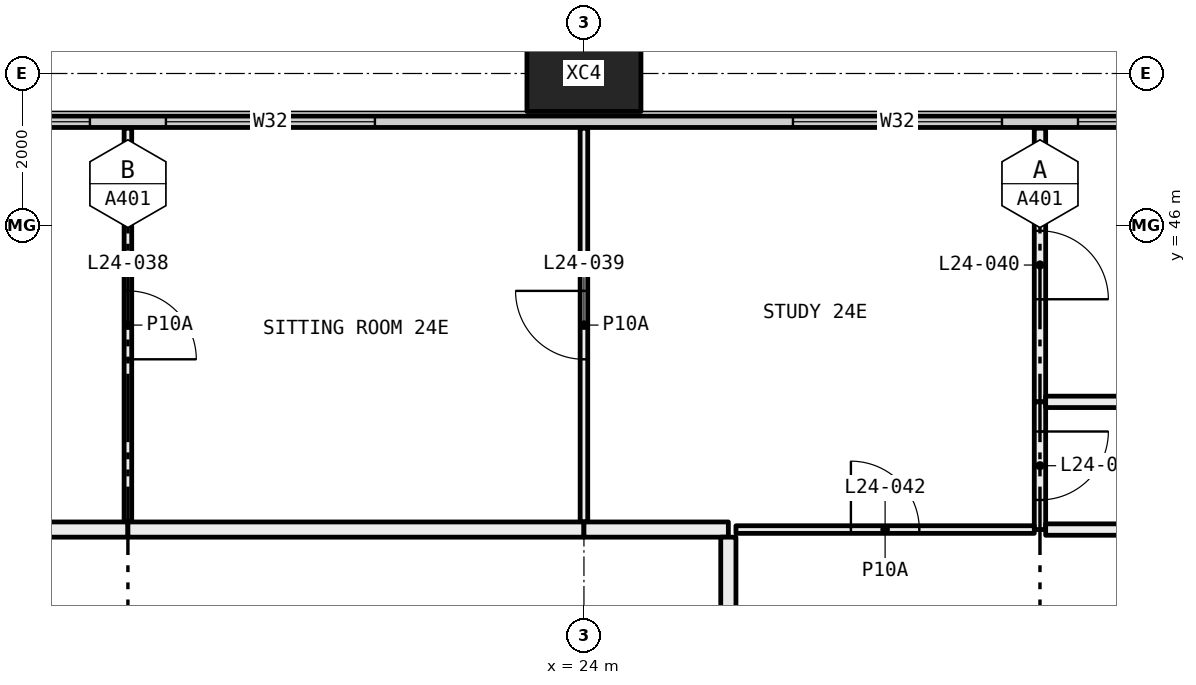
"""IFC4 building model, lengths in metres.
Left out: names, types, materials, properties, quantities, classifications, styles, units other than length and angle.
Written with IfcOpenShell. Run it as: python <this file> out.ifc"""

import sys

from ifc_helpers import new_model, si_unit, direction, frame, frame_2d, origin, origin_2d, place, context, subcontext, project, spatial, rectangle, hollow_rectangle, extrude, element, fill, save


model = new_model("IFC4")
c1 = context("Model", 3, precision=1e-05, world=origin(), true_north=direction((0.0, 1.0)))
c2 = subcontext(c1, "Body", "Model", "MODEL_VIEW")
j1 = project(units=[si_unit("LENGTHUNIT", "METRE"), si_unit("PLANEANGLEUNIT", "RADIAN")], contexts=[c1])
p1 = place(None, origin())
s1 = spatial("IfcSite", under=j1, at=p1, CompositionType="ELEMENT")
p2 = place(p1, origin())
s2 = spatial("IfcBuilding", under=s1, at=p2, CompositionType="ELEMENT")
p3 = place(p2, frame((0.0, 0.0, 96.6)))
s3 = spatial("IfcBuildingStorey", under=s2, at=p3, CompositionType="ELEMENT", Elevation=96.6)
p4 = place(p3, frame((24.0, 48.0, -0.4), z_axis=(0.0, 0.0, 1.0), x_axis=(1.0, 0.0, 0.0)))
e1 = element("IfcColumn", 1, at=p4, inside=s3, PredefinedType="COLUMN", context=c2, shape_type="SweptSolid", body=[
    extrude(hollow_rectangle(XDim=1.5, YDim=1.0, WallThickness=0.06, at=origin_2d()), origin(), (0.0, 0.0, 1.0), 3.45),
])
p5 = place(p3, frame((6.56, 47.365, 0.0), z_axis=(0.0, 0.0, 1.0), x_axis=(1.0, 0.0, 0.0)))
e2 = element("IfcWall", 2, at=p5, inside=s3, PredefinedType="ELEMENTEDWALL", context=c2, shape_type="SweptSolid", body=[
    extrude(rectangle(XDim=58.88, YDim=0.15, at=frame_2d((29.44, 0.0))), origin(), (0.0, 0.0, 1.0), 3.05),
])
p6 = place(p5, frame((0.44, 0.0, 0.45)))
e3 = element("IfcOpeningElement", 3, at=p6, cuts=e2, PredefinedType="OPENING", context=c2, shape_type="SweptSolid", body=[
    extrude(rectangle(XDim=4.5, YDim=2.55, at=frame_2d((2.25, 1.275))), frame((0.0, 0.085, 0.0), z_axis=(0.0, -1.0, 0.0), x_axis=(1.0, 0.0, 0.0)), (0.0, 0.0, 1.0), 0.17),
])
p7 = place(p5, frame((8.19, 0.0, 0.45)))
e4 = element("IfcOpeningElement", 4, at=p7, cuts=e2, PredefinedType="OPENING", context=c2, shape_type="SweptSolid", body=[
    extrude(rectangle(XDim=2.75, YDim=2.55, at=frame_2d((1.375, 1.275))), frame((0.0, 0.085, 0.0), z_axis=(0.0, -1.0, 0.0), x_axis=(1.0, 0.0, 0.0)), (0.0, 0.0, 1.0), 0.17),
])
p8 = place(p5, frame((11.94, 0.0, 0.45)))
e5 = element("IfcOpeningElement", 5, at=p8, cuts=e2, PredefinedType="OPENING", context=c2, shape_type="SweptSolid", body=[
    extrude(rectangle(XDim=2.75, YDim=2.55, at=frame_2d((1.375, 1.275))), frame((0.0, 0.085, 0.0), z_axis=(0.0, -1.0, 0.0), x_axis=(1.0, 0.0, 0.0)), (0.0, 0.0, 1.0), 0.17),
])
p9 = place(p5, frame((20.19, 0.0, 0.45)))
e6 = element("IfcOpeningElement", 6, at=p9, cuts=e2, PredefinedType="OPENING", context=c2, shape_type="SweptSolid", body=[
    extrude(rectangle(XDim=2.75, YDim=2.55, at=frame_2d((1.375, 1.275))), frame((0.0, 0.085, 0.0), z_axis=(0.0, -1.0, 0.0), x_axis=(1.0, 0.0, 0.0)), (0.0, 0.0, 1.0), 0.17),
])
p10 = place(p5, frame((23.94, 0.0, 0.45)))
e7 = element("IfcOpeningElement", 7, at=p10, cuts=e2, PredefinedType="OPENING", context=c2, shape_type="SweptSolid", body=[
    extrude(rectangle(XDim=2.0, YDim=2.55, at=frame_2d((1.0, 1.275))), frame((0.0, 0.085, 0.0), z_axis=(0.0, -1.0, 0.0), x_axis=(1.0, 0.0, 0.0)), (0.0, 0.0, 1.0), 0.17),
])
p11 = place(p5, frame((32.19, 0.0, 0.45)))
e8 = element("IfcOpeningElement", 8, at=p11, cuts=e2, PredefinedType="OPENING", context=c2, shape_type="SweptSolid", body=[
    extrude(rectangle(XDim=2.75, YDim=2.55, at=frame_2d((1.375, 1.275))), frame((0.0, 0.085, 0.0), z_axis=(0.0, -1.0, 0.0), x_axis=(1.0, 0.0, 0.0)), (0.0, 0.0, 1.0), 0.17),
])
p12 = place(p5, frame((35.94, 0.0, 0.45)))
e9 = element("IfcOpeningElement", 9, at=p12, cuts=e2, PredefinedType="OPENING", context=c2, shape_type="SweptSolid", body=[
    extrude(rectangle(XDim=2.75, YDim=2.55, at=frame_2d((1.375, 1.275))), frame((0.0, 0.085, 0.0), z_axis=(0.0, -1.0, 0.0), x_axis=(1.0, 0.0, 0.0)), (0.0, 0.0, 1.0), 0.17),
])
p13 = place(p5, frame((44.19, 0.0, 0.45)))
e10 = element("IfcOpeningElement", 10, at=p13, cuts=e2, PredefinedType="OPENING", context=c2, shape_type="SweptSolid", body=[
    extrude(rectangle(XDim=2.75, YDim=2.55, at=frame_2d((1.375, 1.275))), frame((0.0, 0.085, 0.0), z_axis=(0.0, -1.0, 0.0), x_axis=(1.0, 0.0, 0.0)), (0.0, 0.0, 1.0), 0.17),
])
p14 = place(p5, frame((47.94, 0.0, 0.45)))
e11 = element("IfcOpeningElement", 11, at=p14, cuts=e2, PredefinedType="OPENING", context=c2, shape_type="SweptSolid", body=[
    extrude(rectangle(XDim=2.0, YDim=2.55, at=frame_2d((1.0, 1.275))), frame((0.0, 0.085, 0.0), z_axis=(0.0, -1.0, 0.0), x_axis=(1.0, 0.0, 0.0)), (0.0, 0.0, 1.0), 0.17),
])
p15 = place(p5, frame((53.94, 0.0, 0.45)))
e12 = element("IfcOpeningElement", 12, at=p15, cuts=e2, PredefinedType="OPENING", context=c2, shape_type="SweptSolid", body=[
    extrude(rectangle(XDim=4.5, YDim=2.55, at=frame_2d((2.25, 1.275))), frame((0.0, 0.085, 0.0), z_axis=(0.0, -1.0, 0.0), x_axis=(1.0, 0.0, 0.0)), (0.0, 0.0, 1.0), 0.17),
])
p16 = place(p3, frame((18.0, 42.1, 0.0), z_axis=(0.0, 0.0, 1.0), x_axis=(0.0, 1.0, 0.0)))
e13 = element("IfcWall", 13, at=p16, inside=s3, PredefinedType="PARTITIONING", context=c2, shape_type="SweptSolid", body=[
    extrude(rectangle(XDim=5.18, YDim=0.1, at=frame_2d((2.59, 0.0))), origin(), (0.0, 0.0, 1.0), 3.05),
])
p17 = place(p16, frame((2.14, 0.0, 0.0)))
e14 = element("IfcOpeningElement", 14, at=p17, cuts=e13, PredefinedType="OPENING", context=c2, shape_type="SweptSolid", body=[
    extrude(rectangle(XDim=0.9, YDim=2.1, at=frame_2d((0.45, 1.05))), frame((0.0, 0.06, 0.0), z_axis=(0.0, -1.0, 0.0), x_axis=(1.0, 0.0, 0.0)), (0.0, 0.0, 1.0), 0.12),
])
p18 = place(p3, frame((12.0, 42.0, 0.0), z_axis=(0.0, 0.0, 1.0), x_axis=(1.0, 0.0, 0.0)))
e15 = element("IfcWall", 15, at=p18, inside=s3, PredefinedType="PARTITIONING", context=c2, shape_type="SweptSolid", body=[
    extrude(rectangle(XDim=6.0, YDim=0.2, at=frame_2d((3.0, 0.0))), origin(), (0.0, 0.0, 1.0), 3.05),
])
p19 = place(p18, frame((2.5, 0.0, 0.0)))
e16 = element("IfcOpeningElement", 16, at=p19, cuts=e15, PredefinedType="OPENING", context=c2, shape_type="SweptSolid", body=[
    extrude(rectangle(XDim=1.0, YDim=2.1, at=frame_2d((0.5, 1.05))), frame((0.0, 0.11, 0.0), z_axis=(0.0, -1.0, 0.0), x_axis=(1.0, 0.0, 0.0)), (0.0, 0.0, 1.0), 0.22),
])
p20 = place(p3, frame((24.0, 42.1, 0.0), z_axis=(0.0, 0.0, 1.0), x_axis=(0.0, 1.0, 0.0)))
e17 = element("IfcWall", 17, at=p20, inside=s3, PredefinedType="PARTITIONING", context=c2, shape_type="SweptSolid", body=[
    extrude(rectangle(XDim=5.18, YDim=0.1, at=frame_2d((2.59, 0.0))), origin(), (0.0, 0.0, 1.0), 3.05),
])
p21 = place(p20, frame((2.14, 0.0, 0.0)))
e18 = element("IfcOpeningElement", 18, at=p21, cuts=e17, PredefinedType="OPENING", context=c2, shape_type="SweptSolid", body=[
    extrude(rectangle(XDim=0.9, YDim=2.1, at=frame_2d((0.45, 1.05))), frame((0.0, 0.06, 0.0), z_axis=(0.0, -1.0, 0.0), x_axis=(1.0, 0.0, 0.0)), (0.0, 0.0, 1.0), 0.12),
])
p22 = place(p3, frame((18.0, 42.0, 0.0), z_axis=(0.0, 0.0, 1.0), x_axis=(1.0, 0.0, 0.0)))
e19 = element("IfcWall", 19, at=p22, inside=s3, PredefinedType="PARTITIONING", context=c2, shape_type="SweptSolid", body=[
    extrude(rectangle(XDim=6.0, YDim=0.2, at=frame_2d((3.0, 0.0))), origin(), (0.0, 0.0, 1.0), 3.05),
])
p23 = place(p3, frame((30.0, 43.68, 0.0), z_axis=(0.0, 0.0, 1.0), x_axis=(0.0, 1.0, 0.0)))
e20 = element("IfcWall", 20, at=p23, inside=s3, PredefinedType="PARTITIONING", context=c2, shape_type="SweptSolid", body=[
    extrude(rectangle(XDim=3.6, YDim=0.15, at=frame_2d((1.8, 0.0))), origin(), (0.0, 0.0, 1.0), 3.05),
])
p24 = place(p23, frame((1.35, 0.0, 0.0)))
e21 = element("IfcOpeningElement", 21, at=p24, cuts=e20, PredefinedType="OPENING", context=c2, shape_type="SweptSolid", body=[
    extrude(rectangle(XDim=0.9, YDim=2.1, at=frame_2d((0.45, 1.05))), frame((0.0, 0.085, 0.0), z_axis=(0.0, -1.0, 0.0), x_axis=(1.0, 0.0, 0.0)), (0.0, 0.0, 1.0), 0.17),
])
p25 = place(p3, frame((30.0, 42.0, 0.0), z_axis=(0.0, 0.0, 1.0), x_axis=(0.0, 1.0, 0.0)))
e22 = element("IfcWall", 22, at=p25, inside=s3, PredefinedType="PARTITIONING", context=c2, shape_type="SweptSolid", body=[
    extrude(rectangle(XDim=1.68, YDim=0.15, at=frame_2d((0.84, 0.0))), origin(), (0.0, 0.0, 1.0), 3.05),
])
p26 = place(p25, frame((0.39, 0.0, 0.0)))
e23 = element("IfcOpeningElement", 23, at=p26, cuts=e22, PredefinedType="OPENING", context=c2, shape_type="SweptSolid", body=[
    extrude(rectangle(XDim=0.9, YDim=2.1, at=frame_2d((0.45, 1.05))), frame((0.0, 0.085, 0.0), z_axis=(0.0, -1.0, 0.0), x_axis=(1.0, 0.0, 0.0)), (0.0, 0.0, 1.0), 0.17),
])
p27 = place(p3, frame((26.0, 42.0, 0.0), z_axis=(0.0, 0.0, 1.0), x_axis=(1.0, 0.0, 0.0)))
e24 = element("IfcWall", 24, at=p27, inside=s3, PredefinedType="PARTITIONING", context=c2, shape_type="SweptSolid", body=[
    extrude(rectangle(XDim=3.925, YDim=0.1, at=frame_2d((1.962, 0.0))), origin(), (0.0, 0.0, 1.0), 3.05),
])
p28 = place(p27, frame((1.512, 0.0, 0.0)))
e25 = element("IfcOpeningElement", 25, at=p28, cuts=e24, PredefinedType="OPENING", context=c2, shape_type="SweptSolid", body=[
    extrude(rectangle(XDim=0.9, YDim=2.1, at=frame_2d((0.45, 1.05))), frame((0.0, 0.06, 0.0), z_axis=(0.0, -1.0, 0.0), x_axis=(1.0, 0.0, 0.0)), (0.0, 0.0, 1.0), 0.12),
])
p29 = place(p3, frame((24.0, 42.0, 0.0), z_axis=(0.0, 0.0, 1.0), x_axis=(1.0, 0.0, 0.0)))
e26 = element("IfcWall", 26, at=p29, inside=s3, PredefinedType="PARTITIONING", context=c2, shape_type="SweptSolid", body=[
    extrude(rectangle(XDim=1.9, YDim=0.2, at=frame_2d((0.95, 0.0))), origin(), (0.0, 0.0, 1.0), 3.05),
])
p30 = place(p3, frame((30.075, 43.68, 0.0), z_axis=(0.0, 0.0, 1.0), x_axis=(1.0, 0.0, 0.0)))
e27 = element("IfcWall", 27, at=p30, inside=s3, PredefinedType="PARTITIONING", context=c2, shape_type="SweptSolid", body=[
    extrude(rectangle(XDim=5.925, YDim=0.15, at=frame_2d((2.962, 0.0))), origin(), (0.0, 0.0, 1.0), 2.45),
])
p31 = place(p3, frame((30.075, 42.0, 0.0), z_axis=(0.0, 0.0, 1.0), x_axis=(1.0, 0.0, 0.0)))
e28 = element("IfcWall", 28, at=p31, inside=s3, PredefinedType="PARTITIONING", context=c2, shape_type="SweptSolid", body=[
    extrude(rectangle(XDim=1.425, YDim=0.15, at=frame_2d((0.712, 0.0))), origin(), (0.0, 0.0, 1.0), 3.05),
])
p32 = place(p3, frame((25.9, 41.9, 0.0), z_axis=(0.0, 0.0, 1.0), x_axis=(0.0, -1.0, 0.0)))
e29 = element("IfcWall", 29, at=p32, inside=s3, PredefinedType="PARTITIONING", context=c2, shape_type="SweptSolid", body=[
    extrude(rectangle(XDim=6.2, YDim=0.2, at=frame_2d((3.1, 0.0))), origin(), (0.0, 0.0, 1.0), 2.45),
])
p33 = place(p7, origin())
e30 = element("IfcWindow", 30, at=p33, inside=s3, PartitioningType="SINGLE_PANEL", PredefinedType="WINDOW", context=c2, shape_type="SweptSolid", body=[
    extrude(rectangle(XDim=2.75, YDim=2.55, at=frame_2d((1.375, 1.275))), frame((0.0, 0.03, 0.0), z_axis=(0.0, -1.0, 0.0), x_axis=(1.0, 0.0, 0.0)), (0.0, 0.0, 1.0), 0.06),
])
fill(e4, e30)
p34 = place(p8, origin())
e31 = element("IfcWindow", 31, at=p34, inside=s3, PartitioningType="SINGLE_PANEL", PredefinedType="WINDOW", context=c2, shape_type="SweptSolid", body=[
    extrude(rectangle(XDim=2.75, YDim=2.55, at=frame_2d((1.375, 1.275))), frame((0.0, 0.03, 0.0), z_axis=(0.0, -1.0, 0.0), x_axis=(1.0, 0.0, 0.0)), (0.0, 0.0, 1.0), 0.06),
])
fill(e5, e31)
p35 = place(p9, origin())
e32 = element("IfcWindow", 32, at=p35, inside=s3, PartitioningType="SINGLE_PANEL", PredefinedType="WINDOW", context=c2, shape_type="SweptSolid", body=[
    extrude(rectangle(XDim=2.75, YDim=2.55, at=frame_2d((1.375, 1.275))), frame((0.0, 0.03, 0.0), z_axis=(0.0, -1.0, 0.0), x_axis=(1.0, 0.0, 0.0)), (0.0, 0.0, 1.0), 0.06),
])
fill(e6, e32)
p36 = place(p10, origin())
e33 = element("IfcWindow", 33, at=p36, inside=s3, PartitioningType="SINGLE_PANEL", PredefinedType="WINDOW", context=c2, shape_type="SweptSolid", body=[
    extrude(rectangle(XDim=2.0, YDim=2.55, at=frame_2d((1.0, 1.275))), frame((0.0, 0.03, 0.0), z_axis=(0.0, -1.0, 0.0), x_axis=(1.0, 0.0, 0.0)), (0.0, 0.0, 1.0), 0.06),
])
fill(e7, e33)
p37 = place(p17, frame((0.9, 0.0, 0.0), x_axis=(-1.0, 0.0, 0.0)))
e34 = element("IfcDoor", 34, at=p37, inside=s3, OperationType="SINGLE_SWING_LEFT", PredefinedType="DOOR", context=c2, shape_type="SweptSolid", body=[
    extrude(rectangle(XDim=0.9, YDim=2.1, at=frame_2d((0.45, 1.05))), frame((0.0, 0.025, 0.0), z_axis=(0.0, -1.0, 0.0), x_axis=(1.0, 0.0, 0.0)), (0.0, 0.0, 1.0), 0.05),
])
fill(e14, e34)
p38 = place(p21, origin())
e35 = element("IfcDoor", 35, at=p38, inside=s3, OperationType="SINGLE_SWING_LEFT", PredefinedType="DOOR", context=c2, shape_type="SweptSolid", body=[
    extrude(rectangle(XDim=0.9, YDim=2.1, at=frame_2d((0.45, 1.05))), frame((0.0, 0.025, 0.0), z_axis=(0.0, -1.0, 0.0), x_axis=(1.0, 0.0, 0.0)), (0.0, 0.0, 1.0), 0.05),
])
fill(e18, e35)
p39 = place(p24, frame((0.9, 0.0, 0.0), x_axis=(-1.0, 0.0, 0.0)))
e36 = element("IfcDoor", 36, at=p39, inside=s3, OperationType="SINGLE_SWING_LEFT", PredefinedType="DOOR", context=c2, shape_type="SweptSolid", body=[
    extrude(rectangle(XDim=0.9, YDim=2.1, at=frame_2d((0.45, 1.05))), frame((0.0, 0.025, 0.0), z_axis=(0.0, -1.0, 0.0), x_axis=(1.0, 0.0, 0.0)), (0.0, 0.0, 1.0), 0.05),
])
fill(e21, e36)
p40 = place(p26, frame((0.9, 0.0, 0.0), x_axis=(-1.0, 0.0, 0.0)))
e37 = element("IfcDoor", 37, at=p40, inside=s3, OperationType="SINGLE_SWING_RIGHT", PredefinedType="DOOR", context=c2, shape_type="SweptSolid", body=[
    extrude(rectangle(XDim=0.9, YDim=2.1, at=frame_2d((0.45, 1.05))), frame((0.0, 0.025, 0.0), z_axis=(0.0, -1.0, 0.0), x_axis=(1.0, 0.0, 0.0)), (0.0, 0.0, 1.0), 0.05),
])
fill(e23, e37)
p41 = place(p28, origin())
e38 = element("IfcDoor", 38, at=p41, inside=s3, OperationType="SINGLE_SWING_RIGHT", PredefinedType="DOOR", context=c2, shape_type="SweptSolid", body=[
    extrude(rectangle(XDim=0.9, YDim=2.1, at=frame_2d((0.45, 1.05))), frame((0.0, 0.025, 0.0), z_axis=(0.0, -1.0, 0.0), x_axis=(1.0, 0.0, 0.0)), (0.0, 0.0, 1.0), 0.05),
])
fill(e25, e38)
save(model, sys.argv[1])
